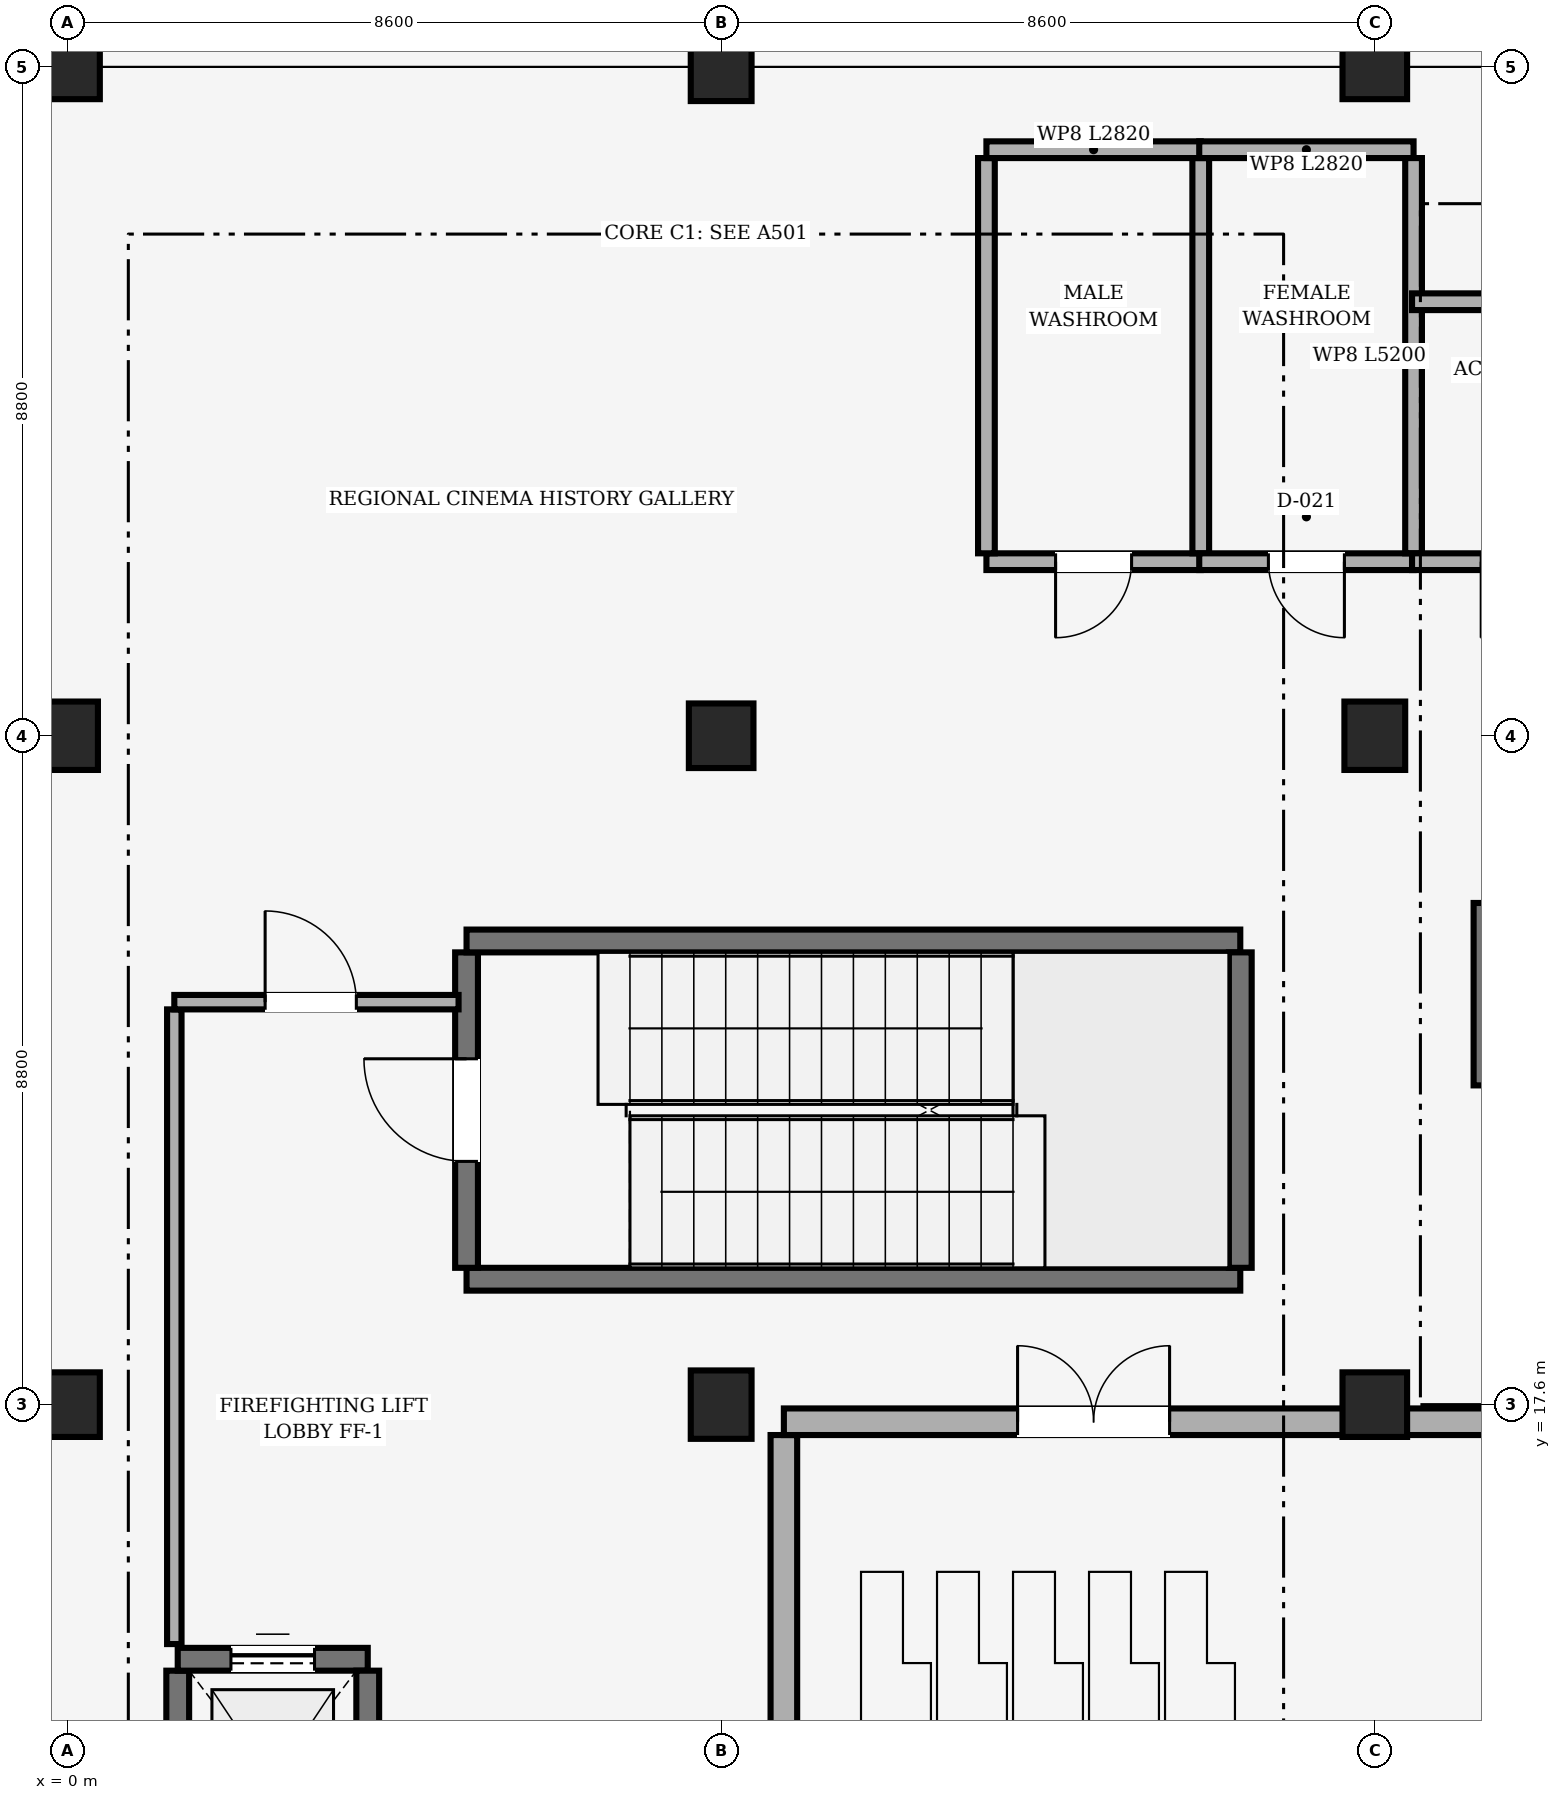
"""IFC4 building model, lengths in metres.
Left out: names, types, materials, properties, quantities, classifications, styles, units other than length and angle.
Written with IfcOpenShell. Run it as: python <this file> out.ifc"""

import sys

from ifc_helpers import new_model, si_unit, direction, frame, frame_2d, origin, origin_2d, place, context, subcontext, project, spatial, rectangle, extrude, element, fill, save


model = new_model("IFC4")
c1 = context("Model", 3, precision=1e-05, world=origin(), true_north=direction((0.0, 1.0)))
c2 = subcontext(c1, "Body", "Model", "MODEL_VIEW")
j1 = project(units=[si_unit("LENGTHUNIT", "METRE"), si_unit("PLANEANGLEUNIT", "RADIAN")], contexts=[c1])
p1 = place(None, origin())
s1 = spatial("IfcSite", under=j1, at=p1, CompositionType="ELEMENT")
p2 = place(p1, origin())
s2 = spatial("IfcBuilding", under=s1, at=p2, CompositionType="ELEMENT")
p3 = place(p2, frame((0.0, 0.0, 4.5)))
s3 = spatial("IfcBuildingStorey", under=s2, at=p3, CompositionType="ELEMENT", Elevation=4.5)
p4 = place(p3, frame((0.0, 17.6, 0.0), z_axis=(0.0, 0.0, 1.0), x_axis=(1.0, 0.0, 0.0)))
e1 = element("IfcColumn", 1, at=p4, inside=s3, PredefinedType="COLUMN", context=c2, shape_type="SweptSolid", body=[
    extrude(rectangle(XDim=0.85, YDim=0.85, at=origin_2d()), origin(), (0.0, 0.0, 1.0), 3.65),
])
p5 = place(p3, frame((0.0, 26.4, 0.0), z_axis=(0.0, 0.0, 1.0), x_axis=(1.0, 0.0, 0.0)))
e2 = element("IfcColumn", 2, at=p5, inside=s3, PredefinedType="COLUMN", context=c2, shape_type="SweptSolid", body=[
    extrude(rectangle(XDim=0.8, YDim=0.9, at=origin_2d()), origin(), (0.0, 0.0, 1.0), 3.65),
])
p6 = place(p3, frame((0.0, 35.2, 0.0), z_axis=(0.0, 0.0, 1.0), x_axis=(1.0, 0.0, 0.0)))
e3 = element("IfcColumn", 3, at=p6, inside=s3, PredefinedType="COLUMN", context=c2, shape_type="SweptSolid", body=[
    extrude(rectangle(XDim=0.85, YDim=0.85, at=origin_2d()), origin(), (0.0, 0.0, 1.0), 3.65),
])
p7 = place(p3, frame((8.6, 17.6, 0.0), z_axis=(0.0, 0.0, 1.0), x_axis=(1.0, 0.0, 0.0)))
e4 = element("IfcColumn", 4, at=p7, inside=s3, PredefinedType="COLUMN", context=c2, shape_type="SweptSolid", body=[
    extrude(rectangle(XDim=0.8, YDim=0.9, at=origin_2d()), origin(), (0.0, 0.0, 1.0), 3.65),
])
p8 = place(p3, frame((8.6, 26.4, 0.0), z_axis=(0.0, 0.0, 1.0), x_axis=(1.0, 0.0, 0.0)))
e5 = element("IfcColumn", 5, at=p8, inside=s3, PredefinedType="COLUMN", context=c2, shape_type="SweptSolid", body=[
    extrude(rectangle(XDim=0.85, YDim=0.85, at=origin_2d()), origin(), (0.0, 0.0, 1.0), 3.65),
])
p9 = place(p3, frame((8.6, 35.2, 0.0), z_axis=(0.0, 0.0, 1.0), x_axis=(1.0, 0.0, 0.0)))
e6 = element("IfcColumn", 6, at=p9, inside=s3, PredefinedType="COLUMN", context=c2, shape_type="SweptSolid", body=[
    extrude(rectangle(XDim=0.8, YDim=0.9, at=origin_2d()), origin(), (0.0, 0.0, 1.0), 3.65),
])
p10 = place(p3, frame((17.2, 17.6, 0.0), z_axis=(0.0, 0.0, 1.0), x_axis=(1.0, 0.0, 0.0)))
e7 = element("IfcColumn", 7, at=p10, inside=s3, PredefinedType="COLUMN", context=c2, shape_type="SweptSolid", body=[
    extrude(rectangle(XDim=0.85, YDim=0.85, at=origin_2d()), origin(), (0.0, 0.0, 1.0), 3.65),
])
p11 = place(p3, frame((17.2, 26.4, 0.0), z_axis=(0.0, 0.0, 1.0), x_axis=(1.0, 0.0, 0.0)))
e8 = element("IfcColumn", 8, at=p11, inside=s3, PredefinedType="COLUMN", context=c2, shape_type="SweptSolid", body=[
    extrude(rectangle(XDim=0.8, YDim=0.9, at=origin_2d()), origin(), (0.0, 0.0, 1.0), 3.65),
])
p12 = place(p3, frame((17.2, 35.2, 0.0), z_axis=(0.0, 0.0, 1.0), x_axis=(1.0, 0.0, 0.0)))
e9 = element("IfcColumn", 9, at=p12, inside=s3, PredefinedType="COLUMN", context=c2, shape_type="SweptSolid", body=[
    extrude(rectangle(XDim=0.85, YDim=0.85, at=origin_2d()), origin(), (0.0, 0.0, 1.0), 3.65),
])
p13 = place(p3, frame((15.43, 19.25, 0.0), z_axis=(0.0, 0.0, 1.0), x_axis=(-1.0, 0.0, 0.0)))
e10 = element("IfcWall", 10, at=p13, inside=s3, PredefinedType="SHEAR", context=c2, shape_type="SweptSolid", body=[
    extrude(rectangle(XDim=10.18, YDim=0.3, at=frame_2d((5.09, 0.0))), origin(), (0.0, 0.0, 1.0), 3.65),
])
p14 = place(p3, frame((5.25, 19.4, 0.0), z_axis=(0.0, 0.0, 1.0), x_axis=(0.0, 1.0, 0.0)))
e11 = element("IfcWall", 11, at=p14, inside=s3, PredefinedType="SHEAR", context=c2, shape_type="SweptSolid", body=[
    extrude(rectangle(XDim=4.15, YDim=0.3, at=frame_2d((2.075, 0.0))), origin(), (0.0, 0.0, 1.0), 3.65),
])
p15 = place(p14, frame((1.4, 0.0, 0.0)))
e12 = element("IfcOpeningElement", 12, at=p15, cuts=e11, PredefinedType="OPENING", context=c2, shape_type="SweptSolid", body=[
    extrude(rectangle(XDim=1.35, YDim=2.2, at=frame_2d((0.675, 1.1))), frame((0.0, 0.15, 0.0), z_axis=(0.0, -1.0, 0.0), x_axis=(1.0, 0.0, 0.0)), (0.0, 0.0, 1.0), 0.3),
])
p16 = place(p3, frame((5.25, 23.7, 0.0), z_axis=(0.0, 0.0, 1.0), x_axis=(1.0, 0.0, 0.0)))
e13 = element("IfcWall", 13, at=p16, inside=s3, PredefinedType="SHEAR", context=c2, shape_type="SweptSolid", body=[
    extrude(rectangle(XDim=10.18, YDim=0.3, at=frame_2d((5.09, 0.0))), origin(), (0.0, 0.0, 1.0), 3.65),
])
p17 = place(p3, frame((15.43, 23.55, 0.0), z_axis=(0.0, 0.0, 1.0), x_axis=(0.0, -1.0, 0.0)))
e14 = element("IfcWall", 14, at=p17, inside=s3, PredefinedType="SHEAR", context=c2, shape_type="SweptSolid", body=[
    extrude(rectangle(XDim=4.15, YDim=0.3, at=frame_2d((2.075, 0.0))), origin(), (0.0, 0.0, 1.0), 3.65),
])
p18 = place(p3, frame((1.45, 11.2, 0.0), z_axis=(0.0, 0.0, 1.0), x_axis=(0.0, 1.0, 0.0)))
e15 = element("IfcWall", 15, at=p18, inside=s3, PredefinedType="SHEAR", context=c2, shape_type="SweptSolid", body=[
    extrude(rectangle(XDim=2.9, YDim=0.3, at=frame_2d((1.45, 0.0))), origin(), (0.0, 0.0, 1.0), 3.65),
])
p19 = place(p3, frame((1.45, 14.25, 0.0), z_axis=(0.0, 0.0, 1.0), x_axis=(1.0, 0.0, 0.0)))
e16 = element("IfcWall", 16, at=p19, inside=s3, PredefinedType="SHEAR", context=c2, shape_type="SweptSolid", body=[
    extrude(rectangle(XDim=2.5, YDim=0.3, at=frame_2d((1.25, 0.0))), origin(), (0.0, 0.0, 1.0), 3.65),
])
p20 = place(p19, frame((0.7, 0.0, 0.0)))
e17 = element("IfcOpeningElement", 17, at=p20, cuts=e16, PredefinedType="OPENING", context=c2, shape_type="SweptSolid", body=[
    extrude(rectangle(XDim=1.1, YDim=2.1, at=frame_2d((0.55, 1.05))), frame((0.0, 0.15, 0.0), z_axis=(0.0, -1.0, 0.0), x_axis=(1.0, 0.0, 0.0)), (0.0, 0.0, 1.0), 0.3),
])
p21 = place(p3, frame((3.95, 14.1, 0.0), z_axis=(0.0, 0.0, 1.0), x_axis=(0.0, -1.0, 0.0)))
e18 = element("IfcWall", 18, at=p21, inside=s3, PredefinedType="SHEAR", context=c2, shape_type="SweptSolid", body=[
    extrude(rectangle(XDim=2.9, YDim=0.3, at=frame_2d((1.45, 0.0))), origin(), (0.0, 0.0, 1.0), 3.65),
])
p22 = place(p3, frame((18.65, 21.8, 0.0), z_axis=(0.0, 0.0, 1.0), x_axis=(0.0, 1.0, 0.0)))
e19 = element("IfcWall", 19, at=p22, inside=s3, PredefinedType="SHEAR", context=c2, shape_type="SweptSolid", body=[
    extrude(rectangle(XDim=2.4, YDim=0.3, at=frame_2d((1.2, 0.0))), origin(), (0.0, 0.0, 1.0), 3.65),
])
p23 = place(p3, frame((1.405, 14.45, 0.0), z_axis=(0.0, 0.0, 1.0), x_axis=(0.0, 1.0, 0.0)))
e20 = element("IfcWall", 20, at=p23, inside=s3, PredefinedType="PARTITIONING", context=c2, shape_type="SweptSolid", body=[
    extrude(rectangle(XDim=8.35, YDim=0.19, at=frame_2d((4.175, 0.0))), origin(), (0.0, 0.0, 1.0), 3.63),
])
p24 = place(p3, frame((1.405, 22.895, 0.0), z_axis=(0.0, 0.0, 1.0), x_axis=(1.0, 0.0, 0.0)))
e21 = element("IfcWall", 21, at=p24, inside=s3, PredefinedType="PARTITIONING", context=c2, shape_type="SweptSolid", body=[
    extrude(rectangle(XDim=3.74, YDim=0.19, at=frame_2d((1.87, 0.0))), origin(), (0.0, 0.0, 1.0), 3.63),
])
p25 = place(p24, frame((1.195, 0.0, 0.0)))
e22 = element("IfcOpeningElement", 22, at=p25, cuts=e21, PredefinedType="OPENING", context=c2, shape_type="SweptSolid", body=[
    extrude(rectangle(XDim=1.2, YDim=2.15, at=frame_2d((0.6, 1.075))), frame((0.0, 0.095, 0.0), z_axis=(0.0, -1.0, 0.0), x_axis=(1.0, 0.0, 0.0)), (0.0, 0.0, 1.0), 0.19),
])
p26 = place(p3, frame((14.91, 28.69, 0.0), z_axis=(0.0, 0.0, 1.0), x_axis=(-1.0, 0.0, 0.0)))
e23 = element("IfcWall", 23, at=p26, inside=s3, PredefinedType="PLUMBINGWALL", context=c2, shape_type="SweptSolid", body=[
    extrude(rectangle(XDim=2.82, YDim=0.22, at=frame_2d((1.41, 0.0))), origin(), (0.0, 0.0, 1.0), 3.63),
])
p27 = place(p26, frame((0.91, 0.0, 0.0)))
e24 = element("IfcOpeningElement", 24, at=p27, cuts=e23, PredefinedType="OPENING", context=c2, shape_type="SweptSolid", body=[
    extrude(rectangle(XDim=1.0, YDim=2.1, at=frame_2d((0.5, 1.05))), frame((0.0, 0.11, 0.0), z_axis=(0.0, -1.0, 0.0), x_axis=(1.0, 0.0, 0.0)), (0.0, 0.0, 1.0), 0.22),
])
p28 = place(p3, frame((12.09, 28.8, 0.0), z_axis=(0.0, 0.0, 1.0), x_axis=(0.0, 1.0, 0.0)))
e25 = element("IfcWall", 25, at=p28, inside=s3, PredefinedType="PLUMBINGWALL", context=c2, shape_type="SweptSolid", body=[
    extrude(rectangle(XDim=5.2, YDim=0.22, at=frame_2d((2.6, 0.0))), origin(), (0.0, 0.0, 1.0), 3.63),
])
p29 = place(p3, frame((12.09, 34.11, 0.0), z_axis=(0.0, 0.0, 1.0), x_axis=(1.0, 0.0, 0.0)))
e26 = element("IfcWall", 26, at=p29, inside=s3, PredefinedType="PLUMBINGWALL", context=c2, shape_type="SweptSolid", body=[
    extrude(rectangle(XDim=2.82, YDim=0.22, at=frame_2d((1.41, 0.0))), origin(), (0.0, 0.0, 1.0), 3.63),
])
p30 = place(p3, frame((14.91, 34.0, 0.0), z_axis=(0.0, 0.0, 1.0), x_axis=(0.0, -1.0, 0.0)))
e27 = element("IfcWall", 27, at=p30, inside=s3, PredefinedType="PLUMBINGWALL", context=c2, shape_type="SweptSolid", body=[
    extrude(rectangle(XDim=5.2, YDim=0.22, at=frame_2d((2.6, 0.0))), origin(), (0.0, 0.0, 1.0), 3.63),
])
p31 = place(p3, frame((17.71, 28.69, 0.0), z_axis=(0.0, 0.0, 1.0), x_axis=(-1.0, 0.0, 0.0)))
e28 = element("IfcWall", 28, at=p31, inside=s3, PredefinedType="PLUMBINGWALL", context=c2, shape_type="SweptSolid", body=[
    extrude(rectangle(XDim=2.82, YDim=0.22, at=frame_2d((1.41, 0.0))), origin(), (0.0, 0.0, 1.0), 3.63),
])
p32 = place(p31, frame((0.91, 0.0, 0.0)))
e29 = element("IfcOpeningElement", 29, at=p32, cuts=e28, PredefinedType="OPENING", context=c2, shape_type="SweptSolid", body=[
    extrude(rectangle(XDim=1.0, YDim=2.1, at=frame_2d((0.5, 1.05))), frame((0.0, 0.11, 0.0), z_axis=(0.0, -1.0, 0.0), x_axis=(1.0, 0.0, 0.0)), (0.0, 0.0, 1.0), 0.22),
])
p33 = place(p3, frame((14.89, 34.11, 0.0), z_axis=(0.0, 0.0, 1.0), x_axis=(1.0, 0.0, 0.0)))
e30 = element("IfcWall", 30, at=p33, inside=s3, PredefinedType="PLUMBINGWALL", context=c2, shape_type="SweptSolid", body=[
    extrude(rectangle(XDim=2.82, YDim=0.22, at=frame_2d((1.41, 0.0))), origin(), (0.0, 0.0, 1.0), 3.63),
])
p34 = place(p3, frame((17.71, 34.0, 0.0), z_axis=(0.0, 0.0, 1.0), x_axis=(0.0, -1.0, 0.0)))
e31 = element("IfcWall", 31, at=p34, inside=s3, PredefinedType="PLUMBINGWALL", context=c2, shape_type="SweptSolid", body=[
    extrude(rectangle(XDim=5.2, YDim=0.22, at=frame_2d((2.6, 0.0))), origin(), (0.0, 0.0, 1.0), 3.63),
])
p35 = place(p3, frame((20.51, 28.69, 0.0), z_axis=(0.0, 0.0, 1.0), x_axis=(-1.0, 0.0, 0.0)))
e32 = element("IfcWall", 32, at=p35, inside=s3, PredefinedType="PLUMBINGWALL", context=c2, shape_type="SweptSolid", body=[
    extrude(rectangle(XDim=2.82, YDim=0.22, at=frame_2d((1.41, 0.0))), origin(), (0.0, 0.0, 1.0), 3.63),
])
p36 = place(p35, frame((0.91, 0.0, 0.0)))
e33 = element("IfcOpeningElement", 33, at=p36, cuts=e32, PredefinedType="OPENING", context=c2, shape_type="SweptSolid", body=[
    extrude(rectangle(XDim=1.0, YDim=2.1, at=frame_2d((0.5, 1.05))), frame((0.0, 0.11, 0.0), z_axis=(0.0, -1.0, 0.0), x_axis=(1.0, 0.0, 0.0)), (0.0, 0.0, 1.0), 0.22),
])
p37 = place(p3, frame((17.69, 32.11, 0.0), z_axis=(0.0, 0.0, 1.0), x_axis=(1.0, 0.0, 0.0)))
e34 = element("IfcWall", 34, at=p37, inside=s3, PredefinedType="PLUMBINGWALL", context=c2, shape_type="SweptSolid", body=[
    extrude(rectangle(XDim=2.82, YDim=0.22, at=frame_2d((1.41, 0.0))), origin(), (0.0, 0.0, 1.0), 3.63),
])
p38 = place(p3, frame((9.425, 0.8, 0.0), z_axis=(0.0, 0.0, 1.0), x_axis=(0.0, 1.0, 0.0)))
e35 = element("IfcWall", 35, at=p38, inside=s3, PredefinedType="SOLIDWALL", context=c2, shape_type="SweptSolid", body=[
    extrude(rectangle(XDim=16.4, YDim=0.35, at=frame_2d((8.2, 0.0))), origin(), (0.0, 0.0, 1.0), 3.63),
])
p39 = place(p3, frame((9.425, 17.375, 0.0), z_axis=(0.0, 0.0, 1.0), x_axis=(1.0, 0.0, 0.0)))
e36 = element("IfcWall", 36, at=p39, inside=s3, PredefinedType="SOLIDWALL", context=c2, shape_type="SweptSolid", body=[
    extrude(rectangle(XDim=16.15, YDim=0.35, at=frame_2d((8.075, 0.0))), origin(), (0.0, 0.0, 1.0), 2.83),
])
p40 = place(p39, frame((3.075, 0.0, 0.0)))
e37 = element("IfcOpeningElement", 37, at=p40, cuts=e36, PredefinedType="OPENING", context=c2, shape_type="SweptSolid", body=[
    extrude(rectangle(XDim=2.0, YDim=2.25, at=frame_2d((1.0, 1.125))), frame((0.0, 0.175, 0.0), z_axis=(0.0, -1.0, 0.0), x_axis=(1.0, 0.0, 0.0)), (0.0, 0.0, 1.0), 0.35),
])
p41 = place(p15, origin())
e38 = element("IfcDoor", 38, at=p41, inside=s3, OperationType="SINGLE_SWING_RIGHT", PredefinedType="DOOR", context=c2, shape_type="SweptSolid", body=[
    extrude(rectangle(XDim=1.35, YDim=2.2, at=frame_2d((0.675, 1.1))), frame((0.0, 0.025, 0.0), z_axis=(0.0, -1.0, 0.0), x_axis=(1.0, 0.0, 0.0)), (0.0, 0.0, 1.0), 0.05),
])
fill(e12, e38)
p42 = place(p20, origin())
e39 = element("IfcDoor", 39, at=p42, inside=s3, OperationType="SLIDING_TO_LEFT", PredefinedType="DOOR", context=c2, shape_type="SweptSolid", body=[
    extrude(rectangle(XDim=1.1, YDim=2.1, at=frame_2d((0.55, 1.05))), frame((0.0, 0.025, 0.0), z_axis=(0.0, -1.0, 0.0), x_axis=(1.0, 0.0, 0.0)), (0.0, 0.0, 1.0), 0.05),
])
fill(e17, e39)
p43 = place(p25, origin())
e40 = element("IfcDoor", 40, at=p43, inside=s3, OperationType="SINGLE_SWING_LEFT", PredefinedType="DOOR", context=c2, shape_type="SweptSolid", body=[
    extrude(rectangle(XDim=1.2, YDim=2.15, at=frame_2d((0.6, 1.075))), frame((0.0, 0.025, 0.0), z_axis=(0.0, -1.0, 0.0), x_axis=(1.0, 0.0, 0.0)), (0.0, 0.0, 1.0), 0.05),
])
fill(e22, e40)
p44 = place(p27, origin())
e41 = element("IfcDoor", 41, at=p44, inside=s3, OperationType="SINGLE_SWING_RIGHT", PredefinedType="DOOR", context=c2, shape_type="SweptSolid", body=[
    extrude(rectangle(XDim=1.0, YDim=2.1, at=frame_2d((0.5, 1.05))), frame((0.0, 0.025, 0.0), z_axis=(0.0, -1.0, 0.0), x_axis=(1.0, 0.0, 0.0)), (0.0, 0.0, 1.0), 0.05),
])
fill(e24, e41)
p45 = place(p32, origin())
e42 = element("IfcDoor", 42, at=p45, inside=s3, OperationType="SINGLE_SWING_LEFT", PredefinedType="DOOR", context=c2, shape_type="SweptSolid", body=[
    extrude(rectangle(XDim=1.0, YDim=2.1, at=frame_2d((0.5, 1.05))), frame((0.0, 0.025, 0.0), z_axis=(0.0, -1.0, 0.0), x_axis=(1.0, 0.0, 0.0)), (0.0, 0.0, 1.0), 0.05),
])
fill(e29, e42)
p46 = place(p40, origin())
e43 = element("IfcDoor", 43, at=p46, inside=s3, OperationType="DOUBLE_DOOR_SINGLE_SWING", PredefinedType="DOOR", context=c2, shape_type="SweptSolid", body=[
    extrude(rectangle(XDim=2.0, YDim=2.25, at=frame_2d((1.0, 1.125))), frame((0.0, 0.025, 0.0), z_axis=(0.0, -1.0, 0.0), x_axis=(1.0, 0.0, 0.0)), (0.0, 0.0, 1.0), 0.05),
])
fill(e37, e43)
save(model, sys.argv[1])
